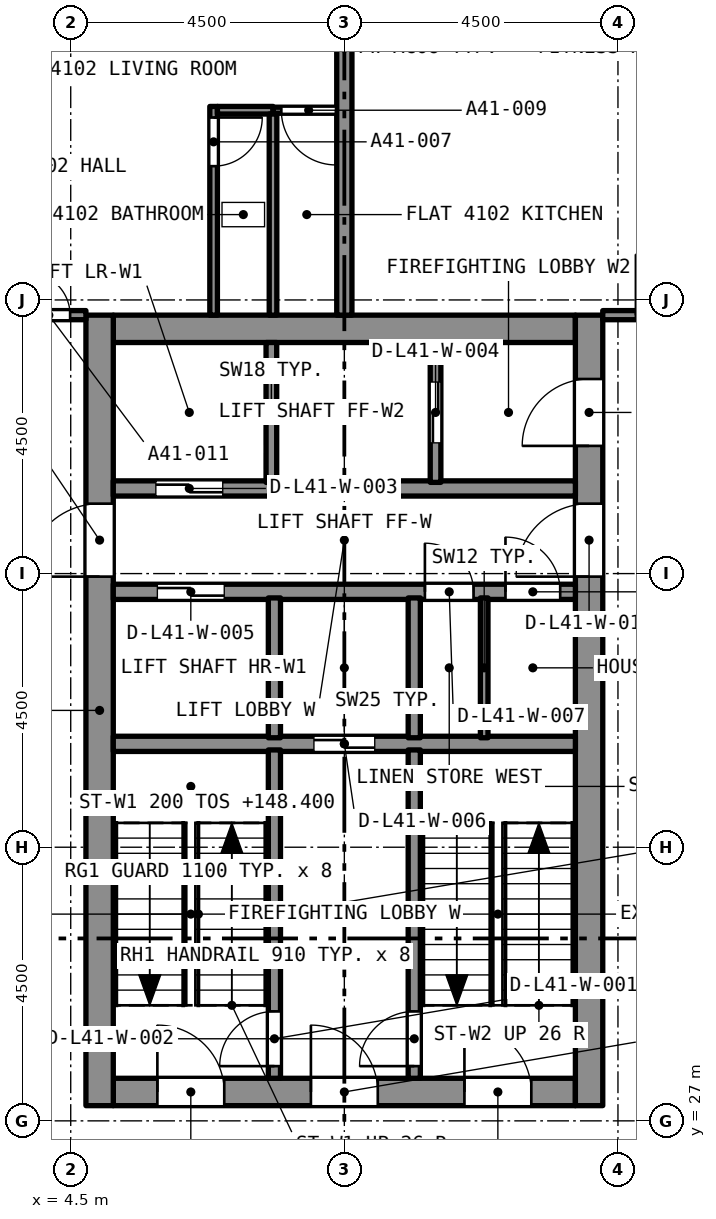
"""IFC4 building model, lengths in metres.
Left out: names, types, materials, properties, quantities, classifications, styles, units other than length and angle.
Written with IfcOpenShell. Run it as: python <this file> out.ifc"""

import sys

from ifc_helpers import new_model, si_unit, direction, frame, frame_2d, origin, place, context, subcontext, project, spatial, rectangle, extrude, element, fill, save


model = new_model("IFC4")
c1 = context("Model", 3, precision=1e-05, world=origin(), true_north=direction((0.0, 1.0)))
c2 = subcontext(c1, "Body", "Model", "MODEL_VIEW")
j1 = project(units=[si_unit("LENGTHUNIT", "METRE"), si_unit("PLANEANGLEUNIT", "RADIAN")], contexts=[c1])
p1 = place(None, origin())
s1 = spatial("IfcSite", under=j1, at=p1, CompositionType="ELEMENT")
p2 = place(p1, origin())
s2 = spatial("IfcBuilding", under=s1, at=p2, CompositionType="ELEMENT")
p3 = place(p2, frame((0.0, 0.0, 146.2)))
s3 = spatial("IfcBuildingStorey", under=s2, at=p3, CompositionType="ELEMENT", Elevation=146.2)
p4 = place(p3, frame((5.2, 27.475, 0.0), z_axis=(0.0, 0.0, 1.0), x_axis=(1.0, 0.0, 0.0)))
e1 = element("IfcWall", 1, at=p4, inside=s3, PredefinedType="SOLIDWALL", context=c2, shape_type="SweptSolid", body=[
    extrude(rectangle(XDim=7.6, YDim=0.45, at=frame_2d((3.8, 0.0))), origin(), (0.0, 0.0, 1.0), 4.4),
])
p5 = place(p4, frame((0.725, 0.0, 0.0)))
e2 = element("IfcOpeningElement", 2, at=p5, cuts=e1, PredefinedType="OPENING", context=c2, shape_type="SweptSolid", body=[
    extrude(rectangle(XDim=1.1, YDim=2.1, at=frame_2d((0.55, 1.05))), frame((0.0, 0.235, 0.0), z_axis=(0.0, -1.0, 0.0), x_axis=(1.0, 0.0, 0.0)), (0.0, 0.0, 1.0), 0.47),
])
p6 = place(p4, frame((3.25, 0.0, 0.0)))
e3 = element("IfcOpeningElement", 3, at=p6, cuts=e1, PredefinedType="OPENING", context=c2, shape_type="SweptSolid", body=[
    extrude(rectangle(XDim=1.1, YDim=2.1, at=frame_2d((0.55, 1.05))), frame((0.0, 0.235, 0.0), z_axis=(0.0, -1.0, 0.0), x_axis=(1.0, 0.0, 0.0)), (0.0, 0.0, 1.0), 0.47),
])
p7 = place(p4, frame((5.775, 0.0, 0.0)))
e4 = element("IfcOpeningElement", 4, at=p7, cuts=e1, PredefinedType="OPENING", context=c2, shape_type="SweptSolid", body=[
    extrude(rectangle(XDim=1.1, YDim=2.1, at=frame_2d((0.55, 1.05))), frame((0.0, 0.235, 0.0), z_axis=(0.0, -1.0, 0.0), x_axis=(1.0, 0.0, 0.0)), (0.0, 0.0, 1.0), 0.47),
])
p8 = place(p3, frame((5.2, 40.025, 0.0), z_axis=(0.0, 0.0, 1.0), x_axis=(1.0, 0.0, 0.0)))
e5 = element("IfcWall", 5, at=p8, inside=s3, PredefinedType="SOLIDWALL", context=c2, shape_type="SweptSolid", body=[
    extrude(rectangle(XDim=7.6, YDim=0.45, at=frame_2d((3.8, 0.0))), origin(), (0.0, 0.0, 1.0), 4.4),
])
p9 = place(p3, frame((4.975, 27.25, 0.0), z_axis=(0.0, 0.0, 1.0), x_axis=(0.0, 1.0, 0.0)))
e6 = element("IfcWall", 6, at=p9, inside=s3, PredefinedType="SOLIDWALL", context=c2, shape_type="SweptSolid", body=[
    extrude(rectangle(XDim=13.0, YDim=0.45, at=frame_2d((6.5, 0.0))), origin(), (0.0, 0.0, 1.0), 4.4),
])
p10 = place(p9, frame((8.7, 0.0, 0.0)))
e7 = element("IfcOpeningElement", 7, at=p10, cuts=e6, PredefinedType="OPENING", context=c2, shape_type="SweptSolid", body=[
    extrude(rectangle(XDim=1.2, YDim=2.1, at=frame_2d((0.6, 1.05))), frame((0.0, 0.235, 0.0), z_axis=(0.0, -1.0, 0.0), x_axis=(1.0, 0.0, 0.0)), (0.0, 0.0, 1.0), 0.47),
])
p11 = place(p3, frame((13.025, 27.25, 0.0), z_axis=(0.0, 0.0, 1.0), x_axis=(0.0, 1.0, 0.0)))
e8 = element("IfcWall", 8, at=p11, inside=s3, PredefinedType="SOLIDWALL", context=c2, shape_type="SweptSolid", body=[
    extrude(rectangle(XDim=13.0, YDim=0.45, at=frame_2d((6.5, 0.0))), origin(), (0.0, 0.0, 1.0), 4.4),
])
p12 = place(p11, frame((10.85, 0.0, 0.0)))
e9 = element("IfcOpeningElement", 9, at=p12, cuts=e8, PredefinedType="OPENING", context=c2, shape_type="SweptSolid", body=[
    extrude(rectangle(XDim=1.1, YDim=2.1, at=frame_2d((0.55, 1.05))), frame((0.0, 0.235, 0.0), z_axis=(0.0, -1.0, 0.0), x_axis=(1.0, 0.0, 0.0)), (0.0, 0.0, 1.0), 0.47),
])
p13 = place(p11, frame((8.7, 0.0, 0.0)))
e10 = element("IfcOpeningElement", 10, at=p13, cuts=e8, PredefinedType="OPENING", context=c2, shape_type="SweptSolid", body=[
    extrude(rectangle(XDim=1.2, YDim=2.1, at=frame_2d((0.6, 1.05))), frame((0.0, 0.235, 0.0), z_axis=(0.0, -1.0, 0.0), x_axis=(1.0, 0.0, 0.0)), (0.0, 0.0, 1.0), 0.47),
])
p14 = place(p3, frame((6.85, 43.683, 0.0), z_axis=(0.0, 0.0, 1.0), x_axis=(0.0, -1.0, 0.0)))
e11 = element("IfcWall", 11, at=p14, inside=s3, PredefinedType="PARTITIONING", context=c2, shape_type="SweptSolid", body=[
    extrude(rectangle(XDim=3.433, YDim=0.125, at=frame_2d((1.716, 0.0))), origin(), (0.0, 0.0, 1.0), 4.1),
])
p15 = place(p14, frame((0.183, 0.0, 0.0)))
e12 = element("IfcOpeningElement", 12, at=p15, cuts=e11, PredefinedType="OPENING", context=c2, shape_type="SweptSolid", body=[
    extrude(rectangle(XDim=0.8, YDim=2.1, at=frame_2d((0.4, 1.05))), frame((0.0, 0.073, 0.0), z_axis=(0.0, -1.0, 0.0), x_axis=(1.0, 0.0, 0.0)), (0.0, 0.0, 1.0), 0.145),
])
p16 = place(p3, frame((6.913, 43.62, 0.0), z_axis=(0.0, 0.0, 1.0), x_axis=(1.0, 0.0, 0.0)))
e13 = element("IfcWall", 13, at=p16, inside=s3, PredefinedType="PARTITIONING", context=c2, shape_type="SweptSolid", body=[
    extrude(rectangle(XDim=0.915, YDim=0.125, at=frame_2d((0.458, 0.0))), origin(), (0.0, 0.0, 1.0), 4.1),
])
p17 = place(p3, frame((7.827, 40.25, 0.0), z_axis=(0.0, 0.0, 1.0), x_axis=(0.0, 1.0, 0.0)))
e14 = element("IfcWall", 14, at=p17, inside=s3, PredefinedType="PARTITIONING", context=c2, shape_type="SweptSolid", body=[
    extrude(rectangle(XDim=3.308, YDim=0.125, at=frame_2d((1.654, 0.0))), origin(), (0.0, 0.0, 1.0), 4.1),
])
p18 = place(p3, frame((8.875, 43.62, 0.0), z_axis=(0.0, 0.0, 1.0), x_axis=(-1.0, 0.0, 0.0)))
e15 = element("IfcWall", 15, at=p18, inside=s3, PredefinedType="PARTITIONING", context=c2, shape_type="SweptSolid", body=[
    extrude(rectangle(XDim=1.048, YDim=0.1, at=frame_2d((0.524, 0.0))), origin(), (0.0, 0.0, 1.0), 4.1),
])
p19 = place(p18, frame((0.011, 0.0, 0.0)))
e16 = element("IfcOpeningElement", 16, at=p19, cuts=e15, PredefinedType="OPENING", context=c2, shape_type="SweptSolid", body=[
    extrude(rectangle(XDim=0.9, YDim=2.1, at=frame_2d((0.45, 1.05))), frame((0.0, 0.06, 0.0), z_axis=(0.0, -1.0, 0.0), x_axis=(1.0, 0.0, 0.0)), (0.0, 0.0, 1.0), 0.12),
])
p20 = place(p3, frame((3.55, 40.25, 0.0), z_axis=(0.0, 0.0, 1.0), x_axis=(1.0, 0.0, 0.0)))
e17 = element("IfcWall", 17, at=p20, inside=s3, PredefinedType="PARTITIONING", context=c2, shape_type="SweptSolid", body=[
    extrude(rectangle(XDim=1.2, YDim=0.15, at=frame_2d((0.6, 0.0))), origin(), (0.0, 0.0, 1.0), 4.1),
])
p21 = place(p20, frame((0.24, 0.0, 0.0)))
e18 = element("IfcOpeningElement", 18, at=p21, cuts=e17, PredefinedType="OPENING", context=c2, shape_type="SweptSolid", body=[
    extrude(rectangle(XDim=0.7, YDim=2.1, at=frame_2d((0.35, 1.05))), frame((0.0, 0.085, 0.0), z_axis=(0.0, -1.0, 0.0), x_axis=(1.0, 0.0, 0.0)), (0.0, 0.0, 1.0), 0.17),
])
p22 = place(p3, frame((9.0, 40.25, 0.0), z_axis=(0.0, 0.0, 1.0), x_axis=(0.0, 1.0, 0.0)))
e19 = element("IfcWall", 19, at=p22, inside=s3, PredefinedType="PARTITIONING", context=c2, shape_type="SweptSolid", body=[
    extrude(rectangle(XDim=8.775, YDim=0.25, at=frame_2d((4.387, 0.0))), origin(), (0.0, 0.0, 1.0), 4.1),
])
p23 = place(p3, frame((13.25, 40.25, 0.0), z_axis=(0.0, 0.0, 1.0), x_axis=(1.0, 0.0, 0.0)))
e20 = element("IfcWall", 20, at=p23, inside=s3, PredefinedType="PARTITIONING", context=c2, shape_type="SweptSolid", body=[
    extrude(rectangle(XDim=1.675, YDim=0.15, at=frame_2d((0.837, 0.0))), origin(), (0.0, 0.0, 1.0), 4.1),
])
p24 = place(p23, frame((0.545, 0.0, 0.0)))
e21 = element("IfcOpeningElement", 21, at=p24, cuts=e20, PredefinedType="OPENING", context=c2, shape_type="SweptSolid", body=[
    extrude(rectangle(XDim=1.0, YDim=2.1, at=frame_2d((0.5, 1.05))), frame((0.0, 0.085, 0.0), z_axis=(0.0, -1.0, 0.0), x_axis=(1.0, 0.0, 0.0)), (0.0, 0.0, 1.0), 0.17),
])
p25 = place(p3, frame((5.2, 33.2, 0.0), z_axis=(0.0, 0.0, 1.0), x_axis=(1.0, 0.0, 0.0)))
e22 = element("IfcWall", 22, at=p25, inside=s3, PredefinedType="SOLIDWALL", context=c2, shape_type="SweptSolid", body=[
    extrude(rectangle(XDim=7.6, YDim=0.25, at=frame_2d((3.8, 0.0))), origin(), (0.0, 0.0, 1.0), 4.1),
])
p26 = place(p25, frame((3.3, 0.0, 0.0)))
e23 = element("IfcOpeningElement", 23, at=p26, cuts=e22, PredefinedType="OPENING", context=c2, shape_type="SweptSolid", body=[
    extrude(rectangle(XDim=1.0, YDim=2.1, at=frame_2d((0.5, 1.05))), frame((0.0, 0.135, 0.0), z_axis=(0.0, -1.0, 0.0), x_axis=(1.0, 0.0, 0.0)), (0.0, 0.0, 1.0), 0.27),
])
p27 = place(p3, frame((5.2, 35.7, 0.0), z_axis=(0.0, 0.0, 1.0), x_axis=(1.0, 0.0, 0.0)))
e24 = element("IfcWall", 24, at=p27, inside=s3, PredefinedType="SOLIDWALL", context=c2, shape_type="SweptSolid", body=[
    extrude(rectangle(XDim=7.6, YDim=0.25, at=frame_2d((3.8, 0.0))), origin(), (0.0, 0.0, 1.0), 4.1),
])
p28 = place(p27, frame((0.725, 0.0, 0.0)))
e25 = element("IfcOpeningElement", 25, at=p28, cuts=e24, PredefinedType="OPENING", context=c2, shape_type="SweptSolid", body=[
    extrude(rectangle(XDim=1.1, YDim=2.4, at=frame_2d((0.55, 1.2))), frame((0.0, 0.135, 0.0), z_axis=(0.0, -1.0, 0.0), x_axis=(1.0, 0.0, 0.0)), (0.0, 0.0, 1.0), 0.27),
])
p29 = place(p27, frame((5.125, 0.0, 0.0)))
e26 = element("IfcOpeningElement", 26, at=p29, cuts=e24, PredefinedType="OPENING", context=c2, shape_type="SweptSolid", body=[
    extrude(rectangle(XDim=0.8, YDim=2.1, at=frame_2d((0.4, 1.05))), frame((0.0, 0.135, 0.0), z_axis=(0.0, -1.0, 0.0), x_axis=(1.0, 0.0, 0.0)), (0.0, 0.0, 1.0), 0.27),
])
p30 = place(p27, frame((6.45, 0.0, 0.0)))
e27 = element("IfcOpeningElement", 27, at=p30, cuts=e24, PredefinedType="OPENING", context=c2, shape_type="SweptSolid", body=[
    extrude(rectangle(XDim=0.9, YDim=2.1, at=frame_2d((0.45, 1.05))), frame((0.0, 0.135, 0.0), z_axis=(0.0, -1.0, 0.0), x_axis=(1.0, 0.0, 0.0)), (0.0, 0.0, 1.0), 0.27),
])
p31 = place(p3, frame((5.2, 37.4, 0.0), z_axis=(0.0, 0.0, 1.0), x_axis=(1.0, 0.0, 0.0)))
e28 = element("IfcWall", 28, at=p31, inside=s3, PredefinedType="SOLIDWALL", context=c2, shape_type="SweptSolid", body=[
    extrude(rectangle(XDim=7.6, YDim=0.25, at=frame_2d((3.8, 0.0))), origin(), (0.0, 0.0, 1.0), 4.1),
])
p32 = place(p31, frame((0.7, 0.0, 0.0)))
e29 = element("IfcOpeningElement", 29, at=p32, cuts=e28, PredefinedType="OPENING", context=c2, shape_type="SweptSolid", body=[
    extrude(rectangle(XDim=1.1, YDim=2.4, at=frame_2d((0.55, 1.2))), frame((0.0, 0.135, 0.0), z_axis=(0.0, -1.0, 0.0), x_axis=(1.0, 0.0, 0.0)), (0.0, 0.0, 1.0), 0.27),
])
p33 = place(p3, frame((7.85, 27.7, 0.0), z_axis=(0.0, 0.0, 1.0), x_axis=(0.0, 1.0, 0.0)))
e30 = element("IfcWall", 30, at=p33, inside=s3, PredefinedType="SOLIDWALL", context=c2, shape_type="SweptSolid", body=[
    extrude(rectangle(XDim=5.4, YDim=0.2, at=frame_2d((2.7, 0.0))), origin(), (0.0, 0.0, 1.0), 4.1),
])
p34 = place(p33, frame((0.2, 0.0, 0.0)))
e31 = element("IfcOpeningElement", 31, at=p34, cuts=e30, PredefinedType="OPENING", context=c2, shape_type="SweptSolid", body=[
    extrude(rectangle(XDim=0.9, YDim=2.1, at=frame_2d((0.45, 1.05))), frame((0.0, 0.11, 0.0), z_axis=(0.0, -1.0, 0.0), x_axis=(1.0, 0.0, 0.0)), (0.0, 0.0, 1.0), 0.22),
])
p35 = place(p3, frame((10.15, 27.7, 0.0), z_axis=(0.0, 0.0, 1.0), x_axis=(0.0, 1.0, 0.0)))
e32 = element("IfcWall", 32, at=p35, inside=s3, PredefinedType="SOLIDWALL", context=c2, shape_type="SweptSolid", body=[
    extrude(rectangle(XDim=5.4, YDim=0.2, at=frame_2d((2.7, 0.0))), origin(), (0.0, 0.0, 1.0), 4.1),
])
p36 = place(p35, frame((0.2, 0.0, 0.0)))
e33 = element("IfcOpeningElement", 33, at=p36, cuts=e32, PredefinedType="OPENING", context=c2, shape_type="SweptSolid", body=[
    extrude(rectangle(XDim=0.9, YDim=2.1, at=frame_2d((0.45, 1.05))), frame((0.0, 0.11, 0.0), z_axis=(0.0, -1.0, 0.0), x_axis=(1.0, 0.0, 0.0)), (0.0, 0.0, 1.0), 0.22),
])
for number, where, z_axis, x_axis in (
    (34, (7.85, 33.3, 0.0), (0.0, 0.0, 1.0), (0.0, 1.0, 0.0)),
    (35, (10.15, 33.3, 0.0), (0.0, 0.0, 1.0), (0.0, 1.0, 0.0)),
):
    element("IfcWall", number, at=place(p3, frame(where, z_axis=z_axis, x_axis=x_axis)), inside=s3, PredefinedType="SOLIDWALL", context=c2, shape_type="SweptSolid", body=[
        extrude(rectangle(XDim=2.3, YDim=0.2, at=frame_2d((1.15, 0.0))), origin(), (0.0, 0.0, 1.0), 4.1),
    ])
p37 = place(p3, frame((7.8, 37.5, 0.0), z_axis=(0.0, 0.0, 1.0), x_axis=(0.0, 1.0, 0.0)))
e36 = element("IfcWall", 36, at=p37, inside=s3, PredefinedType="SOLIDWALL", context=c2, shape_type="SweptSolid", body=[
    extrude(rectangle(XDim=2.3, YDim=0.175, at=frame_2d((1.15, 0.0))), origin(), (0.0, 0.0, 1.0), 4.1),
])
p38 = place(p3, frame((10.5, 37.5, 0.0), z_axis=(0.0, 0.0, 1.0), x_axis=(0.0, 1.0, 0.0)))
e37 = element("IfcWall", 37, at=p38, inside=s3, PredefinedType="SOLIDWALL", context=c2, shape_type="SweptSolid", body=[
    extrude(rectangle(XDim=2.3, YDim=0.175, at=frame_2d((1.15, 0.0))), origin(), (0.0, 0.0, 1.0), 4.1),
])
p39 = place(p38, frame((0.65, 0.0, 0.0)))
e38 = element("IfcOpeningElement", 38, at=p39, cuts=e37, PredefinedType="OPENING", context=c2, shape_type="SweptSolid", body=[
    extrude(rectangle(XDim=1.0, YDim=2.1, at=frame_2d((0.5, 1.05))), frame((0.0, 0.097, 0.0), z_axis=(0.0, -1.0, 0.0), x_axis=(1.0, 0.0, 0.0)), (0.0, 0.0, 1.0), 0.195),
])
p40 = place(p3, frame((11.3, 33.3, 0.0), z_axis=(0.0, 0.0, 1.0), x_axis=(0.0, 1.0, 0.0)))
e39 = element("IfcWall", 39, at=p40, inside=s3, PredefinedType="PARTITIONING", context=c2, shape_type="SweptSolid", body=[
    extrude(rectangle(XDim=2.3, YDim=0.125, at=frame_2d((1.15, 0.0))), origin(), (0.0, 0.0, 1.0), 4.1),
])
p41 = place(p15, origin())
e40 = element("IfcDoor", 40, at=p41, inside=s3, OperationType="SINGLE_SWING_LEFT", PredefinedType="DOOR", context=c2, shape_type="SweptSolid", body=[
    extrude(rectangle(XDim=0.8, YDim=2.1, at=frame_2d((0.4, 1.05))), frame((0.0, 0.025, 0.0), z_axis=(0.0, -1.0, 0.0), x_axis=(1.0, 0.0, 0.0)), (0.0, 0.0, 1.0), 0.05),
])
fill(e12, e40)
p42 = place(p19, origin())
e41 = element("IfcDoor", 41, at=p42, inside=s3, OperationType="SINGLE_SWING_LEFT", PredefinedType="DOOR", context=c2, shape_type="SweptSolid", body=[
    extrude(rectangle(XDim=0.9, YDim=2.1, at=frame_2d((0.45, 1.05))), frame((0.0, 0.025, 0.0), z_axis=(0.0, -1.0, 0.0), x_axis=(1.0, 0.0, 0.0)), (0.0, 0.0, 1.0), 0.05),
])
fill(e16, e41)
p43 = place(p21, origin())
e42 = element("IfcDoor", 42, at=p43, inside=s3, OperationType="SINGLE_SWING_LEFT", PredefinedType="DOOR", context=c2, shape_type="SweptSolid", body=[
    extrude(rectangle(XDim=0.7, YDim=2.1, at=frame_2d((0.35, 1.05))), frame((0.0, 0.025, 0.0), z_axis=(0.0, -1.0, 0.0), x_axis=(1.0, 0.0, 0.0)), (0.0, 0.0, 1.0), 0.05),
])
fill(e18, e42)
p44 = place(p24, origin())
e43 = element("IfcDoor", 43, at=p44, inside=s3, OperationType="SINGLE_SWING_RIGHT", PredefinedType="DOOR", context=c2, shape_type="SweptSolid", body=[
    extrude(rectangle(XDim=1.0, YDim=2.1, at=frame_2d((0.5, 1.05))), frame((0.0, 0.025, 0.0), z_axis=(0.0, -1.0, 0.0), x_axis=(1.0, 0.0, 0.0)), (0.0, 0.0, 1.0), 0.05),
])
fill(e21, e43)
p45 = place(p34, origin())
e44 = element("IfcDoor", 44, at=p45, inside=s3, OperationType="SINGLE_SWING_LEFT", PredefinedType="DOOR", context=c2, shape_type="SweptSolid", body=[
    extrude(rectangle(XDim=0.9, YDim=2.1, at=frame_2d((0.45, 1.05))), frame((0.0, 0.025, 0.0), z_axis=(0.0, -1.0, 0.0), x_axis=(1.0, 0.0, 0.0)), (0.0, 0.0, 1.0), 0.05),
])
fill(e31, e44)
p46 = place(p36, origin())
e45 = element("IfcDoor", 45, at=p46, inside=s3, OperationType="SINGLE_SWING_LEFT", PredefinedType="DOOR", context=c2, shape_type="SweptSolid", body=[
    extrude(rectangle(XDim=0.9, YDim=2.1, at=frame_2d((0.45, 1.05))), frame((0.0, 0.025, 0.0), z_axis=(0.0, -1.0, 0.0), x_axis=(1.0, 0.0, 0.0)), (0.0, 0.0, 1.0), 0.05),
])
fill(e33, e45)
p47 = place(p32, origin())
e46 = element("IfcDoor", 46, at=p47, inside=s3, OperationType="SLIDING_TO_LEFT", PredefinedType="DOOR", context=c2, shape_type="SweptSolid", body=[
    extrude(rectangle(XDim=1.1, YDim=2.4, at=frame_2d((0.55, 1.2))), frame((0.0, 0.025, 0.0), z_axis=(0.0, -1.0, 0.0), x_axis=(1.0, 0.0, 0.0)), (0.0, 0.0, 1.0), 0.05),
])
fill(e29, e46)
p48 = place(p39, origin())
e47 = element("IfcDoor", 47, at=p48, inside=s3, OperationType="SLIDING_TO_LEFT", PredefinedType="DOOR", context=c2, shape_type="SweptSolid", body=[
    extrude(rectangle(XDim=1.0, YDim=2.1, at=frame_2d((0.5, 1.05))), frame((0.0, 0.025, 0.0), z_axis=(0.0, -1.0, 0.0), x_axis=(1.0, 0.0, 0.0)), (0.0, 0.0, 1.0), 0.05),
])
fill(e38, e47)
p49 = place(p28, origin())
e48 = element("IfcDoor", 48, at=p49, inside=s3, OperationType="SLIDING_TO_LEFT", PredefinedType="DOOR", context=c2, shape_type="SweptSolid", body=[
    extrude(rectangle(XDim=1.1, YDim=2.4, at=frame_2d((0.55, 1.2))), frame((0.0, 0.025, 0.0), z_axis=(0.0, -1.0, 0.0), x_axis=(1.0, 0.0, 0.0)), (0.0, 0.0, 1.0), 0.05),
])
fill(e25, e48)
p50 = place(p26, origin())
e49 = element("IfcDoor", 49, at=p50, inside=s3, OperationType="SLIDING_TO_LEFT", PredefinedType="DOOR", context=c2, shape_type="SweptSolid", body=[
    extrude(rectangle(XDim=1.0, YDim=2.1, at=frame_2d((0.5, 1.05))), frame((0.0, 0.025, 0.0), z_axis=(0.0, -1.0, 0.0), x_axis=(1.0, 0.0, 0.0)), (0.0, 0.0, 1.0), 0.05),
])
fill(e23, e49)
p51 = place(p29, origin())
e50 = element("IfcDoor", 50, at=p51, inside=s3, OperationType="SINGLE_SWING_LEFT", PredefinedType="DOOR", context=c2, shape_type="SweptSolid", body=[
    extrude(rectangle(XDim=0.8, YDim=2.1, at=frame_2d((0.4, 1.05))), frame((0.0, 0.025, 0.0), z_axis=(0.0, -1.0, 0.0), x_axis=(1.0, 0.0, 0.0)), (0.0, 0.0, 1.0), 0.05),
])
fill(e26, e50)
p52 = place(p30, origin())
e51 = element("IfcDoor", 51, at=p52, inside=s3, OperationType="SINGLE_SWING_LEFT", PredefinedType="DOOR", context=c2, shape_type="SweptSolid", body=[
    extrude(rectangle(XDim=0.9, YDim=2.1, at=frame_2d((0.45, 1.05))), frame((0.0, 0.025, 0.0), z_axis=(0.0, -1.0, 0.0), x_axis=(1.0, 0.0, 0.0)), (0.0, 0.0, 1.0), 0.05),
])
fill(e27, e51)
p53 = place(p5, origin())
e52 = element("IfcDoor", 52, at=p53, inside=s3, OperationType="SINGLE_SWING_LEFT", PredefinedType="DOOR", context=c2, shape_type="SweptSolid", body=[
    extrude(rectangle(XDim=1.1, YDim=2.1, at=frame_2d((0.55, 1.05))), frame((0.0, 0.025, 0.0), z_axis=(0.0, -1.0, 0.0), x_axis=(1.0, 0.0, 0.0)), (0.0, 0.0, 1.0), 0.05),
])
fill(e2, e52)
p54 = place(p6, origin())
e53 = element("IfcDoor", 53, at=p54, inside=s3, OperationType="SINGLE_SWING_LEFT", PredefinedType="DOOR", context=c2, shape_type="SweptSolid", body=[
    extrude(rectangle(XDim=1.1, YDim=2.1, at=frame_2d((0.55, 1.05))), frame((0.0, 0.025, 0.0), z_axis=(0.0, -1.0, 0.0), x_axis=(1.0, 0.0, 0.0)), (0.0, 0.0, 1.0), 0.05),
])
fill(e3, e53)
p55 = place(p7, origin())
e54 = element("IfcDoor", 54, at=p55, inside=s3, OperationType="SINGLE_SWING_LEFT", PredefinedType="DOOR", context=c2, shape_type="SweptSolid", body=[
    extrude(rectangle(XDim=1.1, YDim=2.1, at=frame_2d((0.55, 1.05))), frame((0.0, 0.025, 0.0), z_axis=(0.0, -1.0, 0.0), x_axis=(1.0, 0.0, 0.0)), (0.0, 0.0, 1.0), 0.05),
])
fill(e4, e54)
p56 = place(p12, origin())
e55 = element("IfcDoor", 55, at=p56, inside=s3, OperationType="SINGLE_SWING_LEFT", PredefinedType="DOOR", context=c2, shape_type="SweptSolid", body=[
    extrude(rectangle(XDim=1.1, YDim=2.1, at=frame_2d((0.55, 1.05))), frame((0.0, 0.025, 0.0), z_axis=(0.0, -1.0, 0.0), x_axis=(1.0, 0.0, 0.0)), (0.0, 0.0, 1.0), 0.05),
])
fill(e9, e55)
p57 = place(p10, origin())
e56 = element("IfcDoor", 56, at=p57, inside=s3, OperationType="SINGLE_SWING_LEFT", PredefinedType="DOOR", context=c2, shape_type="SweptSolid", body=[
    extrude(rectangle(XDim=1.2, YDim=2.1, at=frame_2d((0.6, 1.05))), frame((0.0, 0.025, 0.0), z_axis=(0.0, -1.0, 0.0), x_axis=(1.0, 0.0, 0.0)), (0.0, 0.0, 1.0), 0.05),
])
fill(e7, e56)
p58 = place(p13, origin())
e57 = element("IfcDoor", 57, at=p58, inside=s3, OperationType="SINGLE_SWING_LEFT", PredefinedType="DOOR", context=c2, shape_type="SweptSolid", body=[
    extrude(rectangle(XDim=1.2, YDim=2.1, at=frame_2d((0.6, 1.05))), frame((0.0, 0.025, 0.0), z_axis=(0.0, -1.0, 0.0), x_axis=(1.0, 0.0, 0.0)), (0.0, 0.0, 1.0), 0.05),
])
fill(e10, e57)
save(model, sys.argv[1])
